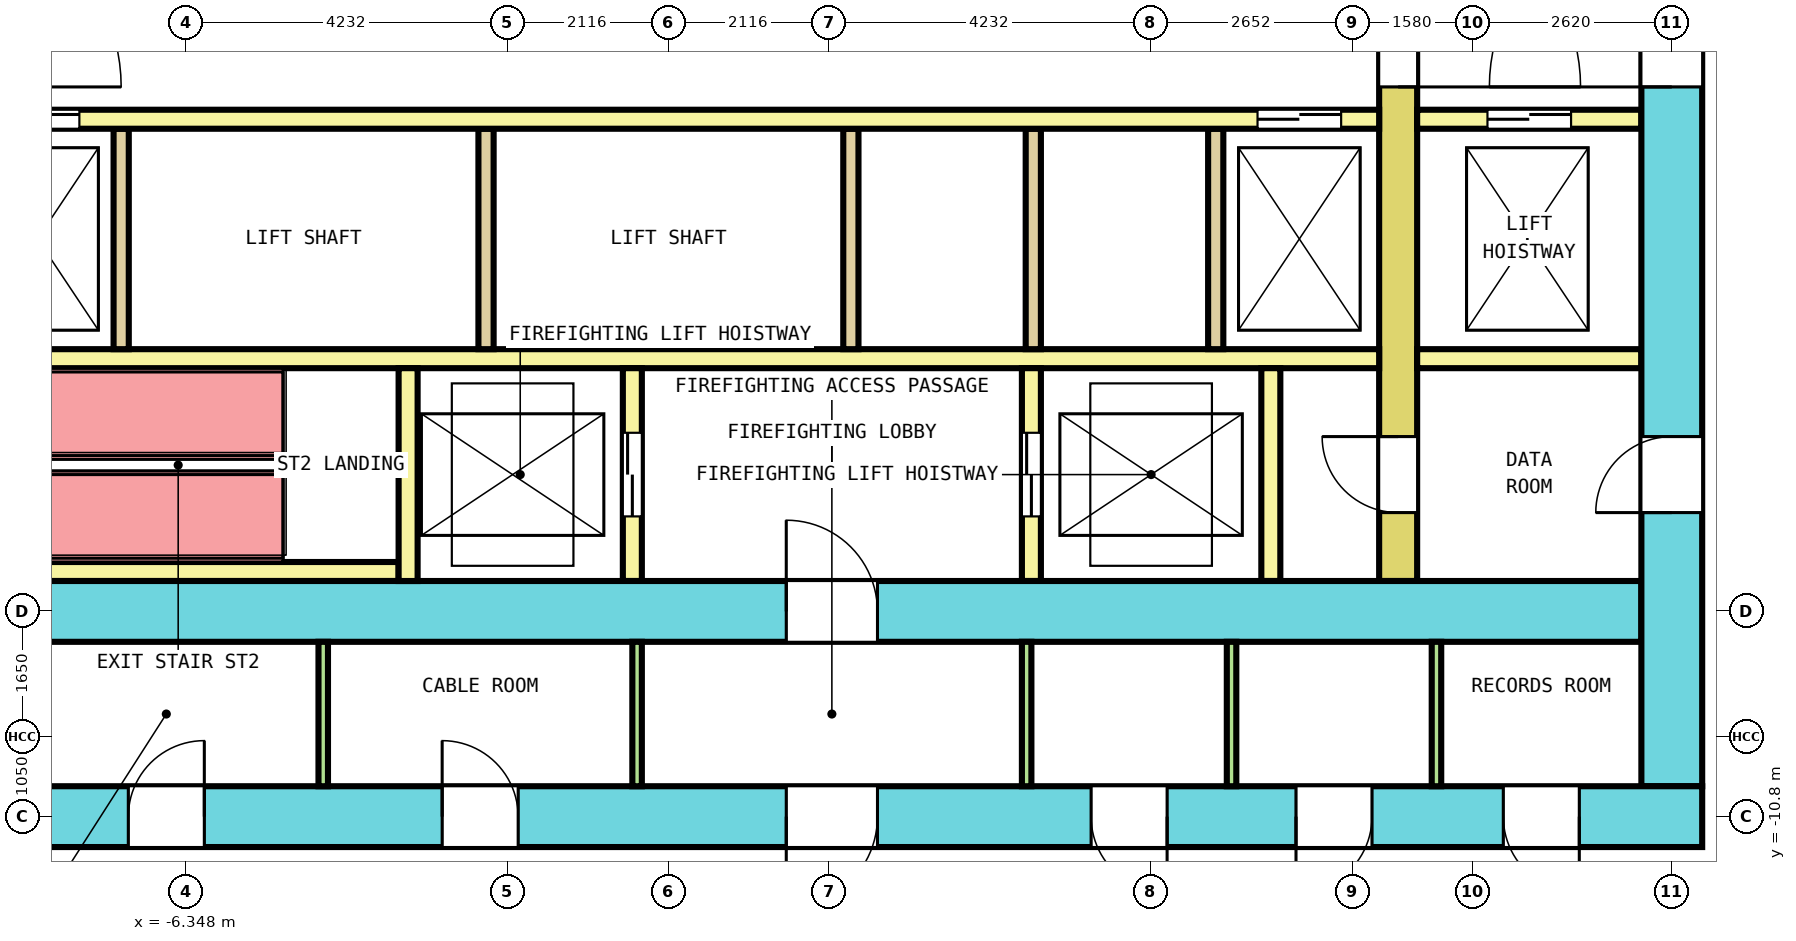
"""IFC4 building model, lengths in metres.
Left out: names, types, materials, properties, quantities, classifications, styles, units other than length and angle.
Written with IfcOpenShell. Run it as: python <this file> out.ifc"""

import sys

from ifc_helpers import new_model, si_unit, direction, frame, frame_2d, origin, place, context, subcontext, project, spatial, rectangle, extrude, element, fill, save


model = new_model("IFC4")
c1 = context("Model", 3, precision=1e-05, world=origin(), true_north=direction((0.0, 1.0)))
c2 = subcontext(c1, "Body", "Model", "MODEL_VIEW")
j1 = project(units=[si_unit("LENGTHUNIT", "METRE"), si_unit("PLANEANGLEUNIT", "RADIAN")], contexts=[c1])
p1 = place(None, origin())
s1 = spatial("IfcSite", under=j1, at=p1, CompositionType="ELEMENT")
p2 = place(p1, origin())
s2 = spatial("IfcBuilding", under=s1, at=p2, CompositionType="ELEMENT")
p3 = place(p2, frame((0.0, 0.0, 102.8)))
s3 = spatial("IfcBuildingStorey", under=s2, at=p3, CompositionType="ELEMENT", Elevation=102.8)
p4 = place(p3, frame((-13.6, -10.8, 0.0), z_axis=(0.0, 0.0, 1.0), x_axis=(1.0, 0.0, 0.0)))
e1 = element("IfcWall", 1, at=p4, inside=s3, PredefinedType="SHEAR", context=c2, shape_type="SweptSolid", body=[
    extrude(rectangle(XDim=27.2, YDim=0.8, at=frame_2d((13.6, 0.0))), origin(), (0.0, 0.0, 1.0), 4.1),
])
p5 = place(p4, frame((2.333, 0.0, 0.0)))
e2 = element("IfcOpeningElement", 2, at=p5, cuts=e1, PredefinedType="OPENING", context=c2, shape_type="SweptSolid", body=[
    extrude(rectangle(XDim=1.0, YDim=2.1, at=frame_2d((0.5, 1.05))), frame((0.0, 0.41, 0.0), z_axis=(0.0, -1.0, 0.0), x_axis=(1.0, 0.0, 0.0)), (0.0, 0.0, 1.0), 0.82),
])
p6 = place(p4, frame((6.494, 0.0, 0.0)))
e3 = element("IfcOpeningElement", 3, at=p6, cuts=e1, PredefinedType="OPENING", context=c2, shape_type="SweptSolid", body=[
    extrude(rectangle(XDim=1.0, YDim=2.1, at=frame_2d((0.5, 1.05))), frame((0.0, 0.41, 0.0), z_axis=(0.0, -1.0, 0.0), x_axis=(1.0, 0.0, 0.0)), (0.0, 0.0, 1.0), 0.82),
])
p7 = place(p4, frame((10.623, 0.0, 0.0)))
e4 = element("IfcOpeningElement", 4, at=p7, cuts=e1, PredefinedType="OPENING", context=c2, shape_type="SweptSolid", body=[
    extrude(rectangle(XDim=1.0, YDim=2.1, at=frame_2d((0.5, 1.05))), frame((0.0, 0.41, 0.0), z_axis=(0.0, -1.0, 0.0), x_axis=(1.0, 0.0, 0.0)), (0.0, 0.0, 1.0), 0.82),
])
p8 = place(p4, frame((19.16, 0.0, 0.0)))
e5 = element("IfcOpeningElement", 5, at=p8, cuts=e1, PredefinedType="OPENING", context=c2, shape_type="SweptSolid", body=[
    extrude(rectangle(XDim=1.0, YDim=2.1, at=frame_2d((0.5, 1.05))), frame((0.0, 0.41, 0.0), z_axis=(0.0, -1.0, 0.0), x_axis=(1.0, 0.0, 0.0)), (0.0, 0.0, 1.0), 0.82),
])
p9 = place(p4, frame((21.856, 0.0, 0.0)))
e6 = element("IfcOpeningElement", 6, at=p9, cuts=e1, PredefinedType="OPENING", context=c2, shape_type="SweptSolid", body=[
    extrude(rectangle(XDim=1.0, YDim=2.1, at=frame_2d((0.5, 1.05))), frame((0.0, 0.41, 0.0), z_axis=(0.0, -1.0, 0.0), x_axis=(1.0, 0.0, 0.0)), (0.0, 0.0, 1.0), 0.82),
])
p10 = place(p4, frame((24.583, 0.0, 0.0)))
e7 = element("IfcOpeningElement", 7, at=p10, cuts=e1, PredefinedType="OPENING", context=c2, shape_type="SweptSolid", body=[
    extrude(rectangle(XDim=1.0, YDim=2.1, at=frame_2d((0.5, 1.05))), frame((0.0, 0.41, 0.0), z_axis=(0.0, -1.0, 0.0), x_axis=(1.0, 0.0, 0.0)), (0.0, 0.0, 1.0), 0.82),
])
p11 = place(p4, frame((15.15, 0.0, 0.0)))
e8 = element("IfcOpeningElement", 8, at=p11, cuts=e1, PredefinedType="OPENING", context=c2, shape_type="SweptSolid", body=[
    extrude(rectangle(XDim=1.2, YDim=2.1, at=frame_2d((0.6, 1.05))), frame((0.0, 0.41, 0.0), z_axis=(0.0, -1.0, 0.0), x_axis=(1.0, 0.0, 0.0)), (0.0, 0.0, 1.0), 0.82),
])
p12 = place(p3, frame((13.2, -10.4, 0.0), z_axis=(0.0, 0.0, 1.0), x_axis=(0.0, 1.0, 0.0)))
e9 = element("IfcWall", 9, at=p12, inside=s3, PredefinedType="SHEAR", context=c2, shape_type="SweptSolid", body=[
    extrude(rectangle(XDim=20.8, YDim=0.8, at=frame_2d((10.4, 0.0))), origin(), (0.0, 0.0, 1.0), 4.1),
])
p13 = place(p12, frame((9.2, 0.0, 0.0)))
e10 = element("IfcOpeningElement", 10, at=p13, cuts=e9, PredefinedType="OPENING", context=c2, shape_type="SweptSolid", body=[
    extrude(rectangle(XDim=2.4, YDim=2.1, at=frame_2d((1.2, 1.05))), frame((0.0, 0.41, 0.0), z_axis=(0.0, -1.0, 0.0), x_axis=(1.0, 0.0, 0.0)), (0.0, 0.0, 1.0), 0.82),
])
p14 = place(p12, frame((16.1, 0.0, 0.0)))
e11 = element("IfcOpeningElement", 11, at=p14, cuts=e9, PredefinedType="OPENING", context=c2, shape_type="SweptSolid", body=[
    extrude(rectangle(XDim=1.2, YDim=2.1, at=frame_2d((0.6, 1.05))), frame((0.0, 0.41, 0.0), z_axis=(0.0, -1.0, 0.0), x_axis=(1.0, 0.0, 0.0)), (0.0, 0.0, 1.0), 0.82),
])
p15 = place(p12, frame((3.6, 0.0, 0.0)))
e12 = element("IfcOpeningElement", 12, at=p15, cuts=e9, PredefinedType="OPENING", context=c2, shape_type="SweptSolid", body=[
    extrude(rectangle(XDim=1.0, YDim=2.1, at=frame_2d((0.5, 1.05))), frame((0.0, 0.41, 0.0), z_axis=(0.0, -1.0, 0.0), x_axis=(1.0, 0.0, 0.0)), (0.0, 0.0, 1.0), 0.82),
])
p16 = place(p3, frame((-12.8, -8.1, 0.0), z_axis=(0.0, 0.0, 1.0), x_axis=(1.0, 0.0, 0.0)))
e13 = element("IfcWall", 13, at=p16, inside=s3, PredefinedType="SHEAR", context=c2, shape_type="SweptSolid", body=[
    extrude(rectangle(XDim=25.6, YDim=0.8, at=frame_2d((12.8, 0.0))), origin(), (0.0, 0.0, 1.0), 4.1),
])
p17 = place(p16, frame((14.35, 0.0, 0.0)))
e14 = element("IfcOpeningElement", 14, at=p17, cuts=e13, PredefinedType="OPENING", context=c2, shape_type="SweptSolid", body=[
    extrude(rectangle(XDim=1.2, YDim=2.1, at=frame_2d((0.6, 1.05))), frame((0.0, 0.41, 0.0), z_axis=(0.0, -1.0, 0.0), x_axis=(1.0, 0.0, 0.0)), (0.0, 0.0, 1.0), 0.82),
])
p18 = place(p3, frame((9.6, -7.7, 0.0), z_axis=(0.0, 0.0, 1.0), x_axis=(0.0, 1.0, 0.0)))
e15 = element("IfcWall", 15, at=p18, inside=s3, PredefinedType="SHEAR", context=c2, shape_type="SweptSolid", body=[
    extrude(rectangle(XDim=15.4, YDim=0.5, at=frame_2d((7.7, 0.0))), origin(), (0.0, 0.0, 1.0), 4.1),
])
p19 = place(p18, frame((6.5, 0.0, 0.0)))
e16 = element("IfcOpeningElement", 16, at=p19, cuts=e15, PredefinedType="OPENING", context=c2, shape_type="SweptSolid", body=[
    extrude(rectangle(XDim=2.4, YDim=2.1, at=frame_2d((1.2, 1.05))), frame((0.0, 0.26, 0.0), z_axis=(0.0, -1.0, 0.0), x_axis=(1.0, 0.0, 0.0)), (0.0, 0.0, 1.0), 0.52),
])
p20 = place(p18, frame((13.4, 0.0, 0.0)))
e17 = element("IfcOpeningElement", 17, at=p20, cuts=e15, PredefinedType="OPENING", context=c2, shape_type="SweptSolid", body=[
    extrude(rectangle(XDim=1.2, YDim=2.1, at=frame_2d((0.6, 1.05))), frame((0.0, 0.26, 0.0), z_axis=(0.0, -1.0, 0.0), x_axis=(1.0, 0.0, 0.0)), (0.0, 0.0, 1.0), 0.52),
])
p21 = place(p18, frame((0.9, 0.0, 0.0)))
e18 = element("IfcOpeningElement", 18, at=p21, cuts=e15, PredefinedType="OPENING", context=c2, shape_type="SweptSolid", body=[
    extrude(rectangle(XDim=1.0, YDim=2.1, at=frame_2d((0.5, 1.05))), frame((0.0, 0.26, 0.0), z_axis=(0.0, -1.0, 0.0), x_axis=(1.0, 0.0, 0.0)), (0.0, 0.0, 1.0), 0.52),
])
p22 = place(p3, frame((-9.35, -1.625, 0.0), z_axis=(0.0, 0.0, 1.0), x_axis=(1.0, 0.0, 0.0)))
e19 = element("IfcWall", 19, at=p22, inside=s3, PredefinedType="SOLIDWALL", context=c2, shape_type="SweptSolid", body=[
    extrude(rectangle(XDim=18.7, YDim=0.25, at=frame_2d((9.35, 0.0))), origin(), (0.0, 0.0, 1.0), 4.1),
])
p23 = place(p22, frame((0.5, 0.0, 0.0)))
e20 = element("IfcOpeningElement", 20, at=p23, cuts=e19, PredefinedType="OPENING", context=c2, shape_type="SweptSolid", body=[
    extrude(rectangle(XDim=1.1, YDim=2.1, at=frame_2d((0.55, 1.05))), frame((0.0, 0.135, 0.0), z_axis=(0.0, -1.0, 0.0), x_axis=(1.0, 0.0, 0.0)), (0.0, 0.0, 1.0), 0.27),
])
p24 = place(p22, frame((17.1, 0.0, 0.0)))
e21 = element("IfcOpeningElement", 21, at=p24, cuts=e19, PredefinedType="OPENING", context=c2, shape_type="SweptSolid", body=[
    extrude(rectangle(XDim=1.1, YDim=2.1, at=frame_2d((0.55, 1.05))), frame((0.0, 0.135, 0.0), z_axis=(0.0, -1.0, 0.0), x_axis=(1.0, 0.0, 0.0)), (0.0, 0.0, 1.0), 0.27),
])
p25 = place(p3, frame((9.85, -1.625, 0.0), z_axis=(0.0, 0.0, 1.0), x_axis=(1.0, 0.0, 0.0)))
e22 = element("IfcWall", 22, at=p25, inside=s3, PredefinedType="SOLIDWALL", context=c2, shape_type="SweptSolid", body=[
    extrude(rectangle(XDim=2.95, YDim=0.25, at=frame_2d((1.475, 0.0))), origin(), (0.0, 0.0, 1.0), 4.1),
])
p26 = place(p25, frame((0.925, 0.0, 0.0)))
e23 = element("IfcOpeningElement", 23, at=p26, cuts=e22, PredefinedType="OPENING", context=c2, shape_type="SweptSolid", body=[
    extrude(rectangle(XDim=1.1, YDim=2.1, at=frame_2d((0.55, 1.05))), frame((0.0, 0.135, 0.0), z_axis=(0.0, -1.0, 0.0), x_axis=(1.0, 0.0, 0.0)), (0.0, 0.0, 1.0), 0.27),
])
p27 = place(p3, frame((-9.35, -4.775, 0.0), z_axis=(0.0, 0.0, 1.0), x_axis=(1.0, 0.0, 0.0)))
e24 = element("IfcWall", 24, at=p27, inside=s3, PredefinedType="SOLIDWALL", context=c2, shape_type="SweptSolid", body=[
    extrude(rectangle(XDim=18.7, YDim=0.25, at=frame_2d((9.35, 0.0))), origin(), (0.0, 0.0, 1.0), 4.1),
])
p28 = place(p3, frame((9.85, -4.775, 0.0), z_axis=(0.0, 0.0, 1.0), x_axis=(1.0, 0.0, 0.0)))
e25 = element("IfcWall", 25, at=p28, inside=s3, PredefinedType="SOLIDWALL", context=c2, shape_type="SweptSolid", body=[
    extrude(rectangle(XDim=2.95, YDim=0.25, at=frame_2d((1.475, 0.0))), origin(), (0.0, 0.0, 1.0), 4.1),
])
for number, where, z_axis, x_axis in (
    (26, (-7.2, -4.65, 0.0), (0.0, 0.0, 1.0), (0.0, 1.0, 0.0)),
    (27, (-2.4, -4.65, 0.0), (0.0, 0.0, 1.0), (0.0, 1.0, 0.0)),
    (28, (2.4, -4.65, 0.0), (0.0, 0.0, 1.0), (0.0, 1.0, 0.0)),
    (29, (4.8, -4.65, 0.0), (0.0, 0.0, 1.0), (0.0, 1.0, 0.0)),
    (30, (7.2, -4.65, 0.0), (0.0, 0.0, 1.0), (0.0, 1.0, 0.0)),
):
    element("IfcWall", number, at=place(p3, frame(where, z_axis=z_axis, x_axis=x_axis)), inside=s3, PredefinedType="SOLIDWALL", context=c2, shape_type="SweptSolid", body=[
        extrude(rectangle(XDim=2.9, YDim=0.2, at=frame_2d((1.45, 0.0))), origin(), (0.0, 0.0, 1.0), 4.1),
    ])
p29 = place(p3, frame((-9.35, -7.575, 0.0), z_axis=(0.0, 0.0, 1.0), x_axis=(1.0, 0.0, 0.0)))
e31 = element("IfcWall", 31, at=p29, inside=s3, PredefinedType="SOLIDWALL", context=c2, shape_type="SweptSolid", body=[
    extrude(rectangle(XDim=5.8, YDim=0.25, at=frame_2d((2.9, 0.0))), origin(), (0.0, 0.0, 1.0), 4.1),
])
p30 = place(p3, frame((-3.425, -7.7, 0.0), z_axis=(0.0, 0.0, 1.0), x_axis=(0.0, 1.0, 0.0)))
e32 = element("IfcWall", 32, at=p30, inside=s3, PredefinedType="SOLIDWALL", context=c2, shape_type="SweptSolid", body=[
    extrude(rectangle(XDim=2.8, YDim=0.25, at=frame_2d((1.4, 0.0))), origin(), (0.0, 0.0, 1.0), 4.1),
])
p31 = place(p3, frame((-0.475, -7.7, 0.0), z_axis=(0.0, 0.0, 1.0), x_axis=(0.0, 1.0, 0.0)))
e33 = element("IfcWall", 33, at=p31, inside=s3, PredefinedType="SOLIDWALL", context=c2, shape_type="SweptSolid", body=[
    extrude(rectangle(XDim=2.8, YDim=0.25, at=frame_2d((1.4, 0.0))), origin(), (0.0, 0.0, 1.0), 4.1),
])
p32 = place(p31, frame((0.85, 0.0, 0.0)))
e34 = element("IfcOpeningElement", 34, at=p32, cuts=e33, PredefinedType="OPENING", context=c2, shape_type="SweptSolid", body=[
    extrude(rectangle(XDim=1.1, YDim=2.1, at=frame_2d((0.55, 1.05))), frame((0.0, 0.135, 0.0), z_axis=(0.0, -1.0, 0.0), x_axis=(1.0, 0.0, 0.0)), (0.0, 0.0, 1.0), 0.27),
])
p33 = place(p3, frame((4.775, -7.7, 0.0), z_axis=(0.0, 0.0, 1.0), x_axis=(0.0, 1.0, 0.0)))
e35 = element("IfcWall", 35, at=p33, inside=s3, PredefinedType="SOLIDWALL", context=c2, shape_type="SweptSolid", body=[
    extrude(rectangle(XDim=2.8, YDim=0.25, at=frame_2d((1.4, 0.0))), origin(), (0.0, 0.0, 1.0), 4.1),
])
p34 = place(p33, frame((0.85, 0.0, 0.0)))
e36 = element("IfcOpeningElement", 36, at=p34, cuts=e35, PredefinedType="OPENING", context=c2, shape_type="SweptSolid", body=[
    extrude(rectangle(XDim=1.1, YDim=2.1, at=frame_2d((0.55, 1.05))), frame((0.0, 0.135, 0.0), z_axis=(0.0, -1.0, 0.0), x_axis=(1.0, 0.0, 0.0)), (0.0, 0.0, 1.0), 0.27),
])
p35 = place(p3, frame((7.925, -7.7, 0.0), z_axis=(0.0, 0.0, 1.0), x_axis=(0.0, 1.0, 0.0)))
e37 = element("IfcWall", 37, at=p35, inside=s3, PredefinedType="SOLIDWALL", context=c2, shape_type="SweptSolid", body=[
    extrude(rectangle(XDim=2.8, YDim=0.25, at=frame_2d((1.4, 0.0))), origin(), (0.0, 0.0, 1.0), 4.1),
])
for number, where, z_axis, x_axis in (
    (38, (-4.542, -10.4, 0.0), (0.0, 0.0, 1.0), (0.0, 1.0, 0.0)),
    (39, (-0.413, -10.4, 0.0), (0.0, 0.0, 1.0), (0.0, 1.0, 0.0)),
    (40, (4.712, -10.4, 0.0), (0.0, 0.0, 1.0), (0.0, 1.0, 0.0)),
    (41, (7.408, -10.4, 0.0), (0.0, 0.0, 1.0), (0.0, 1.0, 0.0)),
    (42, (10.104, -10.4, 0.0), (0.0, 0.0, 1.0), (0.0, 1.0, 0.0)),
):
    element("IfcWall", number, at=place(p3, frame(where, z_axis=z_axis, x_axis=x_axis)), inside=s3, PredefinedType="PARTITIONING", context=c2, shape_type="SweptSolid", body=[
        extrude(rectangle(XDim=1.9, YDim=0.125, at=frame_2d((0.95, 0.0))), origin(), (0.0, 0.0, 1.0), 4.1),
    ])
p36 = place(p23, origin())
e43 = element("IfcDoor", 43, at=p36, inside=s3, OperationType="DOUBLE_DOOR_SLIDING", PredefinedType="DOOR", context=c2, shape_type="SweptSolid", body=[
    extrude(rectangle(XDim=1.1, YDim=2.1, at=frame_2d((0.55, 1.05))), frame((0.0, 0.075, 0.0), z_axis=(0.0, -1.0, 0.0), x_axis=(1.0, 0.0, 0.0)), (0.0, 0.0, 1.0), 0.15),
])
fill(e20, e43)
p37 = place(p24, origin())
e44 = element("IfcDoor", 44, at=p37, inside=s3, OperationType="DOUBLE_DOOR_SLIDING", PredefinedType="DOOR", context=c2, shape_type="SweptSolid", body=[
    extrude(rectangle(XDim=1.1, YDim=2.1, at=frame_2d((0.55, 1.05))), frame((0.0, 0.075, 0.0), z_axis=(0.0, -1.0, 0.0), x_axis=(1.0, 0.0, 0.0)), (0.0, 0.0, 1.0), 0.15),
])
fill(e21, e44)
p38 = place(p26, origin())
e45 = element("IfcDoor", 45, at=p38, inside=s3, OperationType="DOUBLE_DOOR_SLIDING", PredefinedType="DOOR", context=c2, shape_type="SweptSolid", body=[
    extrude(rectangle(XDim=1.1, YDim=2.1, at=frame_2d((0.55, 1.05))), frame((0.0, 0.075, 0.0), z_axis=(0.0, -1.0, 0.0), x_axis=(1.0, 0.0, 0.0)), (0.0, 0.0, 1.0), 0.15),
])
fill(e23, e45)
p39 = place(p32, origin())
e46 = element("IfcDoor", 46, at=p39, inside=s3, OperationType="DOUBLE_DOOR_SLIDING", PredefinedType="DOOR", context=c2, shape_type="SweptSolid", body=[
    extrude(rectangle(XDim=1.1, YDim=2.1, at=frame_2d((0.55, 1.05))), frame((0.0, 0.075, 0.0), z_axis=(0.0, -1.0, 0.0), x_axis=(1.0, 0.0, 0.0)), (0.0, 0.0, 1.0), 0.15),
])
fill(e34, e46)
p40 = place(p34, origin())
e47 = element("IfcDoor", 47, at=p40, inside=s3, OperationType="DOUBLE_DOOR_SLIDING", PredefinedType="DOOR", context=c2, shape_type="SweptSolid", body=[
    extrude(rectangle(XDim=1.1, YDim=2.1, at=frame_2d((0.55, 1.05))), frame((0.0, 0.075, 0.0), z_axis=(0.0, -1.0, 0.0), x_axis=(1.0, 0.0, 0.0)), (0.0, 0.0, 1.0), 0.15),
])
fill(e36, e47)
p41 = place(p19, origin())
e48 = element("IfcDoor", 48, at=p41, inside=s3, OperationType="DOUBLE_DOOR_SINGLE_SWING", PredefinedType="DOOR", context=c2, shape_type="SweptSolid", body=[
    extrude(rectangle(XDim=2.4, YDim=2.1, at=frame_2d((1.2, 1.05))), frame((0.0, 0.2, 0.0), z_axis=(0.0, -1.0, 0.0), x_axis=(1.0, 0.0, 0.0)), (0.0, 0.0, 1.0), 0.4),
])
fill(e16, e48)
p42 = place(p13, origin())
e49 = element("IfcDoor", 49, at=p42, inside=s3, OperationType="DOUBLE_DOOR_SINGLE_SWING", PredefinedType="DOOR", context=c2, shape_type="SweptSolid", body=[
    extrude(rectangle(XDim=2.4, YDim=2.1, at=frame_2d((1.2, 1.05))), frame((0.0, 0.3, 0.0), z_axis=(0.0, -1.0, 0.0), x_axis=(1.0, 0.0, 0.0)), (0.0, 0.0, 1.0), 0.6),
])
fill(e10, e49)
p43 = place(p17, origin())
e50 = element("IfcDoor", 50, at=p43, inside=s3, OperationType="SINGLE_SWING_LEFT", PredefinedType="DOOR", context=c2, shape_type="SweptSolid", body=[
    extrude(rectangle(XDim=1.2, YDim=2.1, at=frame_2d((0.6, 1.05))), frame((0.0, 0.3, 0.0), z_axis=(0.0, -1.0, 0.0), x_axis=(1.0, 0.0, 0.0)), (0.0, 0.0, 1.0), 0.6),
])
fill(e14, e50)
p44 = place(p21, origin())
e51 = element("IfcDoor", 51, at=p44, inside=s3, OperationType="SINGLE_SWING_LEFT", PredefinedType="DOOR", context=c2, shape_type="SweptSolid", body=[
    extrude(rectangle(XDim=1.0, YDim=2.1, at=frame_2d((0.5, 1.05))), frame((0.0, 0.2, 0.0), z_axis=(0.0, -1.0, 0.0), x_axis=(1.0, 0.0, 0.0)), (0.0, 0.0, 1.0), 0.4),
])
fill(e18, e51)
p45 = place(p15, origin())
e52 = element("IfcDoor", 52, at=p45, inside=s3, OperationType="SINGLE_SWING_RIGHT", PredefinedType="DOOR", context=c2, shape_type="SweptSolid", body=[
    extrude(rectangle(XDim=1.0, YDim=2.1, at=frame_2d((0.5, 1.05))), frame((0.0, 0.3, 0.0), z_axis=(0.0, -1.0, 0.0), x_axis=(1.0, 0.0, 0.0)), (0.0, 0.0, 1.0), 0.6),
])
fill(e12, e52)
p46 = place(p6, origin())
e53 = element("IfcDoor", 53, at=p46, inside=s3, OperationType="SINGLE_SWING_RIGHT", PredefinedType="DOOR", context=c2, shape_type="SweptSolid", body=[
    extrude(rectangle(XDim=1.0, YDim=2.1, at=frame_2d((0.5, 1.05))), frame((0.0, 0.3, 0.0), z_axis=(0.0, -1.0, 0.0), x_axis=(1.0, 0.0, 0.0)), (0.0, 0.0, 1.0), 0.6),
])
fill(e3, e53)
p47 = place(p7, origin())
e54 = element("IfcDoor", 54, at=p47, inside=s3, OperationType="SINGLE_SWING_LEFT", PredefinedType="DOOR", context=c2, shape_type="SweptSolid", body=[
    extrude(rectangle(XDim=1.0, YDim=2.1, at=frame_2d((0.5, 1.05))), frame((0.0, 0.3, 0.0), z_axis=(0.0, -1.0, 0.0), x_axis=(1.0, 0.0, 0.0)), (0.0, 0.0, 1.0), 0.6),
])
fill(e4, e54)
p48 = place(p8, origin())
e55 = element("IfcDoor", 55, at=p48, inside=s3, OperationType="SINGLE_SWING_RIGHT", PredefinedType="DOOR", context=c2, shape_type="SweptSolid", body=[
    extrude(rectangle(XDim=1.0, YDim=2.1, at=frame_2d((0.5, 1.05))), frame((0.0, 0.3, 0.0), z_axis=(0.0, -1.0, 0.0), x_axis=(1.0, 0.0, 0.0)), (0.0, 0.0, 1.0), 0.6),
])
fill(e5, e55)
p49 = place(p9, origin())
e56 = element("IfcDoor", 56, at=p49, inside=s3, OperationType="SINGLE_SWING_LEFT", PredefinedType="DOOR", context=c2, shape_type="SweptSolid", body=[
    extrude(rectangle(XDim=1.0, YDim=2.1, at=frame_2d((0.5, 1.05))), frame((0.0, 0.3, 0.0), z_axis=(0.0, -1.0, 0.0), x_axis=(1.0, 0.0, 0.0)), (0.0, 0.0, 1.0), 0.6),
])
fill(e6, e56)
p50 = place(p10, origin())
e57 = element("IfcDoor", 57, at=p50, inside=s3, OperationType="SINGLE_SWING_RIGHT", PredefinedType="DOOR", context=c2, shape_type="SweptSolid", body=[
    extrude(rectangle(XDim=1.0, YDim=2.1, at=frame_2d((0.5, 1.05))), frame((0.0, 0.3, 0.0), z_axis=(0.0, -1.0, 0.0), x_axis=(1.0, 0.0, 0.0)), (0.0, 0.0, 1.0), 0.6),
])
fill(e7, e57)
p51 = place(p11, origin())
e58 = element("IfcDoor", 58, at=p51, inside=s3, OperationType="SINGLE_SWING_LEFT", PredefinedType="DOOR", context=c2, shape_type="SweptSolid", body=[
    extrude(rectangle(XDim=1.2, YDim=2.1, at=frame_2d((0.6, 1.05))), frame((0.0, 0.3, 0.0), z_axis=(0.0, -1.0, 0.0), x_axis=(1.0, 0.0, 0.0)), (0.0, 0.0, 1.0), 0.6),
])
fill(e8, e58)
save(model, sys.argv[1])
